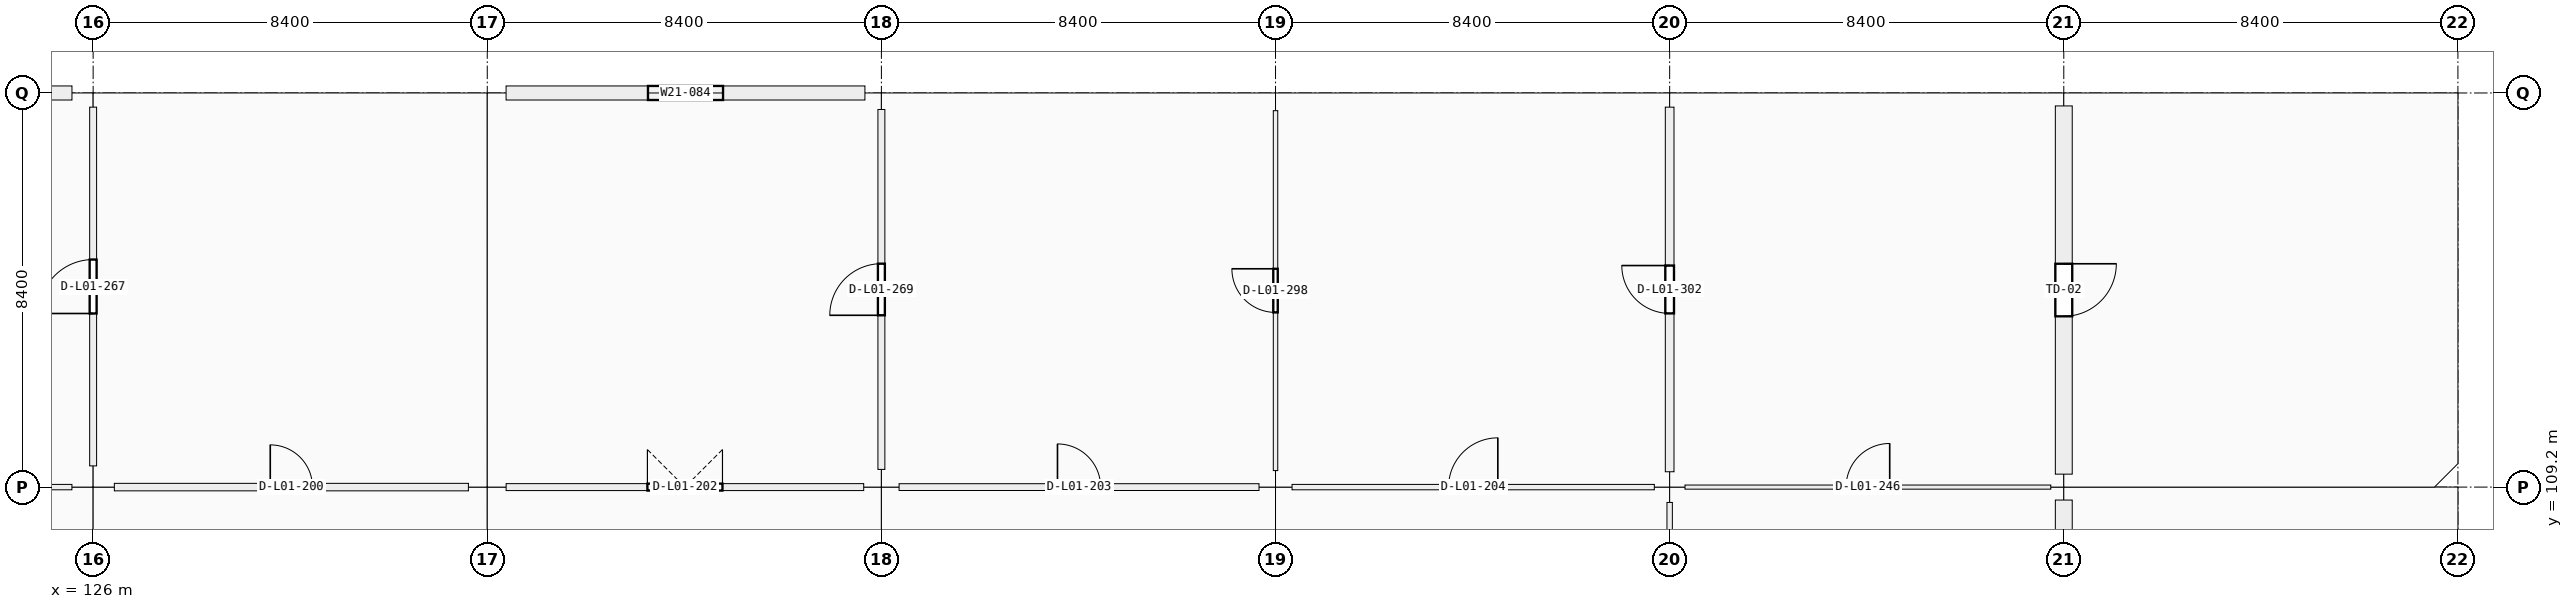
"""IFC4 building model, lengths in metres.
Left out: names, types, materials, properties, quantities, classifications, styles, units other than length and angle.
Written with IfcOpenShell. Run it as: python <this file> out.ifc"""

import sys

from ifc_helpers import new_model, si_unit, direction, frame, frame_2d, origin, origin_2d, place, context, subcontext, project, spatial, rectangle, extrude, element, fill, save


model = new_model("IFC4")
c1 = context("Model", 3, precision=1e-05, world=origin(), true_north=direction((0.0, 1.0)))
c2 = subcontext(c1, "Body", "Model", "MODEL_VIEW")
j1 = project(units=[si_unit("LENGTHUNIT", "METRE"), si_unit("PLANEANGLEUNIT", "RADIAN")], contexts=[c1])
p1 = place(None, origin())
s1 = spatial("IfcSite", under=j1, at=p1, CompositionType="ELEMENT")
p2 = place(p1, origin())
s2 = spatial("IfcBuilding", under=s1, at=p2, CompositionType="ELEMENT")
p3 = place(p2, frame((0.0, 0.0, 5.76)))
s3 = spatial("IfcBuildingStorey", under=s2, at=p3, CompositionType="ELEMENT", Elevation=5.76)
p4 = place(p3, frame((126.0, 109.2, 0.0), z_axis=(0.0, 0.0, 1.0), x_axis=(1.0, 0.0, 0.0)))
e1 = element("IfcColumn", 1, at=p4, inside=s3, PredefinedType="COLUMN", context=c2, shape_type="SweptSolid", body=[
    extrude(rectangle(XDim=0.9, YDim=0.9, at=origin_2d()), origin(), (0.0, 0.0, 1.0), 4.5),
])
p5 = place(p3, frame((126.0, 117.6, 0.0), z_axis=(0.0, 0.0, 1.0), x_axis=(1.0, 0.0, 0.0)))
e2 = element("IfcColumn", 2, at=p5, inside=s3, PredefinedType="COLUMN", context=c2, shape_type="SweptSolid", body=[
    extrude(rectangle(XDim=0.9, YDim=0.6, at=origin_2d()), origin(), (0.0, 0.0, 1.0), 4.5),
])
p6 = place(p3, frame((134.4, 109.2, 0.0), z_axis=(0.0, 0.0, 1.0), x_axis=(1.0, 0.0, 0.0)))
e3 = element("IfcColumn", 3, at=p6, inside=s3, PredefinedType="COLUMN", context=c2, shape_type="SweptSolid", body=[
    extrude(rectangle(XDim=0.8, YDim=0.8, at=origin_2d()), origin(), (0.0, 0.0, 1.0), 4.5),
])
p7 = place(p3, frame((134.4, 117.6, 0.0), z_axis=(0.0, 0.0, 1.0), x_axis=(1.0, 0.0, 0.0)))
e4 = element("IfcColumn", 4, at=p7, inside=s3, PredefinedType="COLUMN", context=c2, shape_type="SweptSolid", body=[
    extrude(rectangle(XDim=0.8, YDim=0.55, at=origin_2d()), origin(), (0.0, 0.0, 1.0), 4.5),
])
p8 = place(p3, frame((142.8, 109.2, 0.0), z_axis=(0.0, 0.0, 1.0), x_axis=(1.0, 0.0, 0.0)))
e5 = element("IfcColumn", 5, at=p8, inside=s3, PredefinedType="COLUMN", context=c2, shape_type="SweptSolid", body=[
    extrude(rectangle(XDim=0.75, YDim=0.75, at=origin_2d()), origin(), (0.0, 0.0, 1.0), 4.5),
])
for number, where, z_axis, x_axis in (
    (6, (142.8, 117.6, 0.0), (0.0, 0.0, 1.0), (1.0, 0.0, 0.0)),
    (7, (151.2, 109.2, 0.0), (0.0, 0.0, 1.0), (1.0, 0.0, 0.0)),
):
    element("IfcColumn", number, at=place(p3, frame(where, z_axis=z_axis, x_axis=x_axis)), inside=s3, PredefinedType="COLUMN", context=c2, shape_type="SweptSolid", body=[
        extrude(rectangle(XDim=0.7, YDim=0.7, at=origin_2d()), origin(), (0.0, 0.0, 1.0), 4.5),
    ])
p9 = place(p3, frame((151.2, 117.6, 0.0), z_axis=(0.0, 0.0, 1.0), x_axis=(1.0, 0.0, 0.0)))
e8 = element("IfcColumn", 8, at=p9, inside=s3, PredefinedType="COLUMN", context=c2, shape_type="SweptSolid", body=[
    extrude(rectangle(XDim=0.75, YDim=0.75, at=origin_2d()), origin(), (0.0, 0.0, 1.0), 4.5),
])
p10 = place(p3, frame((159.6, 109.2, 0.0), z_axis=(0.0, 0.0, 1.0), x_axis=(1.0, 0.0, 0.0)))
e9 = element("IfcColumn", 9, at=p10, inside=s3, PredefinedType="COLUMN", context=c2, shape_type="SweptSolid", body=[
    extrude(rectangle(XDim=0.65, YDim=0.65, at=origin_2d()), origin(), (0.0, 0.0, 1.0), 4.5),
])
p11 = place(p3, frame((159.6, 117.6, 0.0), z_axis=(0.0, 0.0, 1.0), x_axis=(1.0, 0.0, 0.0)))
e10 = element("IfcColumn", 10, at=p11, inside=s3, PredefinedType="COLUMN", context=c2, shape_type="SweptSolid", body=[
    extrude(rectangle(XDim=0.6, YDim=0.6, at=origin_2d()), origin(), (0.0, 0.0, 1.0), 4.5),
])
for number, where, z_axis, x_axis in (
    (11, (168.0, 109.2, 0.0), (0.0, 0.0, 1.0), (1.0, 0.0, 0.0)),
    (12, (168.0, 117.6, 0.0), (0.0, 0.0, 1.0), (1.0, 0.0, 0.0)),
):
    element("IfcColumn", number, at=place(p3, frame(where, z_axis=z_axis, x_axis=x_axis)), inside=s3, PredefinedType="COLUMN", context=c2, shape_type="SweptSolid", body=[
        extrude(rectangle(XDim=0.55, YDim=0.55, at=origin_2d()), origin(), (0.0, 0.0, 1.0), 4.2),
    ])
p12 = place(p3, frame((118.051, 117.6, 0.0), z_axis=(0.0, 0.0, 1.0), x_axis=(1.0, 0.0, 0.0)))
e13 = element("IfcWall", 13, at=p12, inside=s3, PredefinedType="SOLIDWALL", context=c2, shape_type="SweptSolid", body=[
    extrude(rectangle(XDim=7.498, YDim=0.3, at=frame_2d((3.749, 0.0))), origin(), (0.0, 0.0, 1.0), 3.4),
])
p13 = place(p12, frame((2.499, 0.0, 0.9)))
e14 = element("IfcOpeningElement", 14, at=p13, cuts=e13, PredefinedType="OPENING", context=c2, shape_type="SweptSolid", body=[
    extrude(rectangle(XDim=2.5, YDim=1.65, at=frame_2d((1.25, 0.825))), frame((0.0, 0.15, 0.0), z_axis=(0.0, -1.0, 0.0), x_axis=(1.0, 0.0, 0.0)), (0.0, 0.0, 1.0), 0.3),
])
p14 = place(p3, frame((134.801, 117.6, 0.0), z_axis=(0.0, 0.0, 1.0), x_axis=(1.0, 0.0, 0.0)))
e15 = element("IfcWall", 15, at=p14, inside=s3, PredefinedType="SOLIDWALL", context=c2, shape_type="SweptSolid", body=[
    extrude(rectangle(XDim=7.648, YDim=0.3, at=frame_2d((3.824, 0.0))), origin(), (0.0, 0.0, 1.0), 3.4),
])
p15 = place(p14, frame((3.024, 0.0, 0.9)))
e16 = element("IfcOpeningElement", 16, at=p15, cuts=e15, PredefinedType="OPENING", context=c2, shape_type="SweptSolid", body=[
    extrude(rectangle(XDim=1.6, YDim=2.25, at=frame_2d((0.8, 1.125))), frame((0.0, 0.15, 0.0), z_axis=(0.0, -1.0, 0.0), x_axis=(1.0, 0.0, 0.0)), (0.0, 0.0, 1.0), 0.3),
])
p16 = place(p3, frame((168.0, 108.924, 0.0), z_axis=(0.0, 0.0, 1.0), x_axis=(0.0, -1.0, 0.0)))
e17 = element("IfcWall", 17, at=p16, inside=s3, PredefinedType="SOLIDWALL", context=c2, shape_type="SweptSolid", body=[
    extrude(rectangle(XDim=7.848, YDim=0.36, at=frame_2d((3.924, 0.0))), origin(), (0.0, 0.0, 1.0), 3.4),
])
p17 = place(p16, frame((3.099, 0.0, 0.0)))
e18 = element("IfcOpeningElement", 18, at=p17, cuts=e17, PredefinedType="OPENING", context=c2, shape_type="SweptSolid", body=[
    extrude(rectangle(XDim=1.65, YDim=2.2, at=frame_2d((0.825, 1.1))), frame((0.0, 0.18, 0.0), z_axis=(0.0, -1.0, 0.0), x_axis=(1.0, 0.0, 0.0)), (0.0, 0.0, 1.0), 0.36),
])
p18 = place(p3, frame((168.0, 117.324, 0.0), z_axis=(0.0, 0.0, 1.0), x_axis=(0.0, -1.0, 0.0)))
e19 = element("IfcWall", 19, at=p18, inside=s3, PredefinedType="SOLIDWALL", context=c2, shape_type="SweptSolid", body=[
    extrude(rectangle(XDim=7.848, YDim=0.36, at=frame_2d((3.924, 0.0))), origin(), (0.0, 0.0, 1.0), 3.4),
])
p19 = place(p18, frame((3.364, 0.0, 0.0)))
e20 = element("IfcOpeningElement", 20, at=p19, cuts=e19, PredefinedType="OPENING", context=c2, shape_type="SweptSolid", body=[
    extrude(rectangle(XDim=1.12, YDim=2.2, at=frame_2d((0.56, 1.1))), frame((0.0, 0.18, 0.0), z_axis=(0.0, -1.0, 0.0), x_axis=(1.0, 0.0, 0.0)), (0.0, 0.0, 1.0), 0.36),
])
p20 = place(p3, frame((118.052, 109.2, 0.0), z_axis=(0.0, 0.0, 1.0), x_axis=(1.0, 0.0, 0.0)))
e21 = element("IfcWall", 21, at=p20, inside=s3, PredefinedType="PARTITIONING", context=c2, shape_type="SweptSolid", body=[
    extrude(rectangle(XDim=7.496, YDim=0.115, at=frame_2d((3.748, 0.0))), origin(), (0.0, 0.0, 1.0), 2.4),
])
p21 = place(p20, frame((3.248, 0.0, 0.0)))
e22 = element("IfcOpeningElement", 22, at=p21, cuts=e21, PredefinedType="OPENING", context=c2, shape_type="SweptSolid", body=[
    extrude(rectangle(XDim=1.0, YDim=2.2, at=frame_2d((0.5, 1.1))), frame((0.0, 0.058, 0.0), z_axis=(0.0, -1.0, 0.0), x_axis=(1.0, 0.0, 0.0)), (0.0, 0.0, 1.0), 0.115),
])
p22 = place(p3, frame((126.452, 109.2, 0.0), z_axis=(0.0, 0.0, 1.0), x_axis=(1.0, 0.0, 0.0)))
e23 = element("IfcWall", 23, at=p22, inside=s3, PredefinedType="PARTITIONING", context=c2, shape_type="SweptSolid", body=[
    extrude(rectangle(XDim=7.546, YDim=0.16, at=frame_2d((3.773, 0.0))), origin(), (0.0, 0.0, 1.0), 2.4),
])
p23 = place(p22, frame((3.323, 0.0, 0.0)))
e24 = element("IfcOpeningElement", 24, at=p23, cuts=e23, PredefinedType="OPENING", context=c2, shape_type="SweptSolid", body=[
    extrude(rectangle(XDim=0.9, YDim=2.05, at=frame_2d((0.45, 1.025))), frame((0.0, 0.08, 0.0), z_axis=(0.0, -1.0, 0.0), x_axis=(1.0, 0.0, 0.0)), (0.0, 0.0, 1.0), 0.16),
])
p24 = place(p3, frame((134.802, 109.2, 0.0), z_axis=(0.0, 0.0, 1.0), x_axis=(1.0, 0.0, 0.0)))
e25 = element("IfcWall", 25, at=p24, inside=s3, PredefinedType="PARTITIONING", context=c2, shape_type="SweptSolid", body=[
    extrude(rectangle(XDim=7.621, YDim=0.148, at=frame_2d((3.811, 0.0))), origin(), (0.0, 0.0, 1.0), 2.4),
])
p25 = place(p24, frame((3.011, 0.0, 0.0)))
e26 = element("IfcOpeningElement", 26, at=p25, cuts=e25, PredefinedType="OPENING", context=c2, shape_type="SweptSolid", body=[
    extrude(rectangle(XDim=1.6, YDim=2.2, at=frame_2d((0.8, 1.1))), frame((0.0, 0.074, 0.0), z_axis=(0.0, -1.0, 0.0), x_axis=(1.0, 0.0, 0.0)), (0.0, 0.0, 1.0), 0.148),
])
p26 = place(p3, frame((143.177, 109.2, 0.0), z_axis=(0.0, 0.0, 1.0), x_axis=(1.0, 0.0, 0.0)))
e27 = element("IfcWall", 27, at=p26, inside=s3, PredefinedType="PARTITIONING", context=c2, shape_type="SweptSolid", body=[
    extrude(rectangle(XDim=7.671, YDim=0.145, at=frame_2d((3.835, 0.0))), origin(), (0.0, 0.0, 1.0), 2.4),
])
p27 = place(p26, frame((3.376, 0.0, 0.0)))
e28 = element("IfcOpeningElement", 28, at=p27, cuts=e27, PredefinedType="OPENING", context=c2, shape_type="SweptSolid", body=[
    extrude(rectangle(XDim=0.92, YDim=2.15, at=frame_2d((0.46, 1.075))), frame((0.0, 0.073, 0.0), z_axis=(0.0, -1.0, 0.0), x_axis=(1.0, 0.0, 0.0)), (0.0, 0.0, 1.0), 0.145),
])
p28 = place(p3, frame((151.552, 109.2, 0.0), z_axis=(0.0, 0.0, 1.0), x_axis=(1.0, 0.0, 0.0)))
e29 = element("IfcWall", 29, at=p28, inside=s3, PredefinedType="PARTITIONING", context=c2, shape_type="SweptSolid", body=[
    extrude(rectangle(XDim=7.721, YDim=0.115, at=frame_2d((3.86, 0.0))), origin(), (0.0, 0.0, 1.0), 2.4),
])
p29 = place(p28, frame((3.336, 0.0, 0.0)))
e30 = element("IfcOpeningElement", 30, at=p29, cuts=e29, PredefinedType="OPENING", context=c2, shape_type="SweptSolid", body=[
    extrude(rectangle(XDim=1.05, YDim=2.12, at=frame_2d((0.525, 1.06))), frame((0.0, 0.058, 0.0), z_axis=(0.0, -1.0, 0.0), x_axis=(1.0, 0.0, 0.0)), (0.0, 0.0, 1.0), 0.115),
])
p30 = place(p3, frame((159.927, 109.2, 0.0), z_axis=(0.0, 0.0, 1.0), x_axis=(1.0, 0.0, 0.0)))
e31 = element("IfcWall", 31, at=p30, inside=s3, PredefinedType="PARTITIONING", context=c2, shape_type="SweptSolid", body=[
    extrude(rectangle(XDim=7.796, YDim=0.088, at=frame_2d((3.898, 0.0))), origin(), (0.0, 0.0, 1.0), 2.4),
])
p31 = place(p30, frame((3.433, 0.0, 0.0)))
e32 = element("IfcOpeningElement", 32, at=p31, cuts=e31, PredefinedType="OPENING", context=c2, shape_type="SweptSolid", body=[
    extrude(rectangle(XDim=0.93, YDim=2.12, at=frame_2d((0.465, 1.06))), frame((0.0, 0.044, 0.0), z_axis=(0.0, -1.0, 0.0), x_axis=(1.0, 0.0, 0.0)), (0.0, 0.0, 1.0), 0.088),
])
p32 = place(p3, frame((126.0, 109.652, 0.0), z_axis=(0.0, 0.0, 1.0), x_axis=(0.0, 1.0, 0.0)))
e33 = element("IfcWall", 33, at=p32, inside=s3, PredefinedType="PARTITIONING", context=c2, shape_type="SweptSolid", body=[
    extrude(rectangle(XDim=7.646, YDim=0.148, at=frame_2d((3.823, 0.0))), origin(), (0.0, 0.0, 1.0), 2.4),
])
p33 = place(p32, frame((3.248, 0.0, 0.0)))
e34 = element("IfcOpeningElement", 34, at=p33, cuts=e33, PredefinedType="OPENING", context=c2, shape_type="SweptSolid", body=[
    extrude(rectangle(XDim=1.15, YDim=2.2, at=frame_2d((0.575, 1.1))), frame((0.0, 0.074, 0.0), z_axis=(0.0, -1.0, 0.0), x_axis=(1.0, 0.0, 0.0)), (0.0, 0.0, 1.0), 0.148),
])
p34 = place(p3, frame((142.8, 109.577, 0.0), z_axis=(0.0, 0.0, 1.0), x_axis=(0.0, 1.0, 0.0)))
e35 = element("IfcWall", 35, at=p34, inside=s3, PredefinedType="PARTITIONING", context=c2, shape_type="SweptSolid", body=[
    extrude(rectangle(XDim=7.671, YDim=0.148, at=frame_2d((3.835, 0.0))), origin(), (0.0, 0.0, 1.0), 2.4),
])
p35 = place(p34, frame((3.285, 0.0, 0.0)))
e36 = element("IfcOpeningElement", 36, at=p35, cuts=e35, PredefinedType="OPENING", context=c2, shape_type="SweptSolid", body=[
    extrude(rectangle(XDim=1.1, YDim=2.15, at=frame_2d((0.55, 1.075))), frame((0.0, 0.074, 0.0), z_axis=(0.0, -1.0, 0.0), x_axis=(1.0, 0.0, 0.0)), (0.0, 0.0, 1.0), 0.148),
])
p36 = place(p3, frame((151.2, 109.552, 0.0), z_axis=(0.0, 0.0, 1.0), x_axis=(0.0, 1.0, 0.0)))
e37 = element("IfcWall", 37, at=p36, inside=s3, PredefinedType="PARTITIONING", context=c2, shape_type="SweptSolid", body=[
    extrude(rectangle(XDim=7.671, YDim=0.095, at=frame_2d((3.835, 0.0))), origin(), (0.0, 0.0, 1.0), 2.4),
])
p37 = place(p36, frame((3.371, 0.0, 0.0)))
e38 = element("IfcOpeningElement", 38, at=p37, cuts=e37, PredefinedType="OPENING", context=c2, shape_type="SweptSolid", body=[
    extrude(rectangle(XDim=0.93, YDim=2.12, at=frame_2d((0.465, 1.06))), frame((0.0, 0.047, 0.0), z_axis=(0.0, -1.0, 0.0), x_axis=(1.0, 0.0, 0.0)), (0.0, 0.0, 1.0), 0.095),
])
p38 = place(p3, frame((159.6, 101.102, 0.0), z_axis=(0.0, 0.0, 1.0), x_axis=(0.0, 1.0, 0.0)))
e39 = element("IfcWall", 39, at=p38, inside=s3, PredefinedType="PARTITIONING", context=c2, shape_type="SweptSolid", body=[
    extrude(rectangle(XDim=7.771, YDim=0.115, at=frame_2d((3.885, 0.0))), origin(), (0.0, 0.0, 1.0), 2.4),
])
p39 = place(p38, frame((3.381, 0.0, 0.0)))
e40 = element("IfcOpeningElement", 40, at=p39, cuts=e39, PredefinedType="OPENING", context=c2, shape_type="SweptSolid", body=[
    extrude(rectangle(XDim=1.01, YDim=2.12, at=frame_2d((0.505, 1.06))), frame((0.0, 0.058, 0.0), z_axis=(0.0, -1.0, 0.0), x_axis=(1.0, 0.0, 0.0)), (0.0, 0.0, 1.0), 0.115),
])
p40 = place(p3, frame((159.6, 109.527, 0.0), z_axis=(0.0, 0.0, 1.0), x_axis=(0.0, 1.0, 0.0)))
e41 = element("IfcWall", 41, at=p40, inside=s3, PredefinedType="PARTITIONING", context=c2, shape_type="SweptSolid", body=[
    extrude(rectangle(XDim=7.771, YDim=0.185, at=frame_2d((3.885, 0.0))), origin(), (0.0, 0.0, 1.0), 2.4),
])
p41 = place(p40, frame((3.375, 0.0, 0.0)))
e42 = element("IfcOpeningElement", 42, at=p41, cuts=e41, PredefinedType="OPENING", context=c2, shape_type="SweptSolid", body=[
    extrude(rectangle(XDim=1.02, YDim=2.2, at=frame_2d((0.51, 1.1))), frame((0.0, 0.093, 0.0), z_axis=(0.0, -1.0, 0.0), x_axis=(1.0, 0.0, 0.0)), (0.0, 0.0, 1.0), 0.185),
])
p42 = place(p15, origin())
e43 = element("IfcWindow", 43, at=p42, inside=s3, PartitioningType="SINGLE_PANEL", PredefinedType="WINDOW", context=c2, shape_type="SweptSolid", body=[
    extrude(rectangle(XDim=1.6, YDim=2.25, at=frame_2d((0.8, 1.125))), frame((0.0, 0.03, 0.0), z_axis=(0.0, -1.0, 0.0), x_axis=(1.0, 0.0, 0.0)), (0.0, 0.0, 1.0), 0.06),
])
fill(e16, e43)
p43 = place(p19, origin())
e44 = element("IfcDoor", 44, at=p43, inside=s3, OperationType="SINGLE_SWING_LEFT", PredefinedType="DOOR", context=c2, shape_type="SweptSolid", body=[
    extrude(rectangle(XDim=1.12, YDim=2.2, at=frame_2d((0.56, 1.1))), frame((0.0, 0.025, 0.0), z_axis=(0.0, -1.0, 0.0), x_axis=(1.0, 0.0, 0.0)), (0.0, 0.0, 1.0), 0.05),
])
fill(e20, e44)
p44 = place(p23, origin())
e45 = element("IfcDoor", 45, at=p44, inside=s3, OperationType="SINGLE_SWING_LEFT", PredefinedType="DOOR", context=c2, shape_type="SweptSolid", body=[
    extrude(rectangle(XDim=0.9, YDim=2.05, at=frame_2d((0.45, 1.025))), frame((0.0, 0.025, 0.0), z_axis=(0.0, -1.0, 0.0), x_axis=(1.0, 0.0, 0.0)), (0.0, 0.0, 1.0), 0.05),
])
fill(e24, e45)
p45 = place(p25, origin())
e46 = element("IfcDoor", 46, at=p45, inside=s3, OperationType="DOUBLE_DOOR_SINGLE_SWING", PredefinedType="DOOR", context=c2, shape_type="SweptSolid", body=[
    extrude(rectangle(XDim=1.6, YDim=2.2, at=frame_2d((0.8, 1.1))), frame((0.0, 0.025, 0.0), z_axis=(0.0, -1.0, 0.0), x_axis=(1.0, 0.0, 0.0)), (0.0, 0.0, 1.0), 0.05),
])
fill(e26, e46)
p46 = place(p27, origin())
e47 = element("IfcDoor", 47, at=p46, inside=s3, OperationType="SINGLE_SWING_LEFT", PredefinedType="DOOR", context=c2, shape_type="SweptSolid", body=[
    extrude(rectangle(XDim=0.92, YDim=2.15, at=frame_2d((0.46, 1.075))), frame((0.0, 0.025, 0.0), z_axis=(0.0, -1.0, 0.0), x_axis=(1.0, 0.0, 0.0)), (0.0, 0.0, 1.0), 0.05),
])
fill(e28, e47)
p47 = place(p29, origin())
e48 = element("IfcDoor", 48, at=p47, inside=s3, OperationType="SINGLE_SWING_RIGHT", PredefinedType="DOOR", context=c2, shape_type="SweptSolid", body=[
    extrude(rectangle(XDim=1.05, YDim=2.12, at=frame_2d((0.525, 1.06))), frame((0.0, 0.025, 0.0), z_axis=(0.0, -1.0, 0.0), x_axis=(1.0, 0.0, 0.0)), (0.0, 0.0, 1.0), 0.05),
])
fill(e30, e48)
p48 = place(p31, origin())
e49 = element("IfcDoor", 49, at=p48, inside=s3, OperationType="SINGLE_SWING_RIGHT", PredefinedType="DOOR", context=c2, shape_type="SweptSolid", body=[
    extrude(rectangle(XDim=0.93, YDim=2.12, at=frame_2d((0.465, 1.06))), frame((0.0, 0.025, 0.0), z_axis=(0.0, -1.0, 0.0), x_axis=(1.0, 0.0, 0.0)), (0.0, 0.0, 1.0), 0.05),
])
fill(e32, e49)
p49 = place(p33, origin())
e50 = element("IfcDoor", 50, at=p49, inside=s3, OperationType="SINGLE_SWING_LEFT", PredefinedType="DOOR", context=c2, shape_type="SweptSolid", body=[
    extrude(rectangle(XDim=1.15, YDim=2.2, at=frame_2d((0.575, 1.1))), frame((0.0, 0.025, 0.0), z_axis=(0.0, -1.0, 0.0), x_axis=(1.0, 0.0, 0.0)), (0.0, 0.0, 1.0), 0.05),
])
fill(e34, e50)
p50 = place(p35, origin())
e51 = element("IfcDoor", 51, at=p50, inside=s3, OperationType="SINGLE_SWING_LEFT", PredefinedType="DOOR", context=c2, shape_type="SweptSolid", body=[
    extrude(rectangle(XDim=1.1, YDim=2.15, at=frame_2d((0.55, 1.075))), frame((0.0, 0.025, 0.0), z_axis=(0.0, -1.0, 0.0), x_axis=(1.0, 0.0, 0.0)), (0.0, 0.0, 1.0), 0.05),
])
fill(e36, e51)
p51 = place(p37, origin())
e52 = element("IfcDoor", 52, at=p51, inside=s3, OperationType="SINGLE_SWING_RIGHT", PredefinedType="DOOR", context=c2, shape_type="SweptSolid", body=[
    extrude(rectangle(XDim=0.93, YDim=2.12, at=frame_2d((0.465, 1.06))), frame((0.0, 0.025, 0.0), z_axis=(0.0, -1.0, 0.0), x_axis=(1.0, 0.0, 0.0)), (0.0, 0.0, 1.0), 0.05),
])
fill(e38, e52)
p52 = place(p41, origin())
e53 = element("IfcDoor", 53, at=p52, inside=s3, OperationType="SINGLE_SWING_RIGHT", PredefinedType="DOOR", context=c2, shape_type="SweptSolid", body=[
    extrude(rectangle(XDim=1.02, YDim=2.2, at=frame_2d((0.51, 1.1))), frame((0.0, 0.025, 0.0), z_axis=(0.0, -1.0, 0.0), x_axis=(1.0, 0.0, 0.0)), (0.0, 0.0, 1.0), 0.05),
])
fill(e42, e53)
save(model, sys.argv[1])
